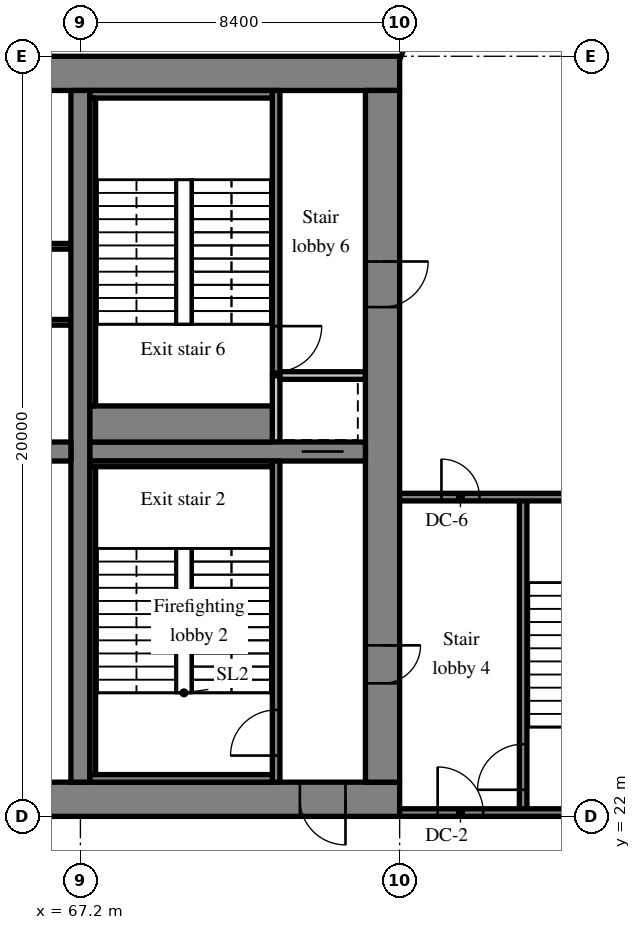
"""IFC4 building model, lengths in metres.
Left out: names, types, materials, properties, quantities, classifications, styles, units other than length and angle.
Written with IfcOpenShell. Run it as: python <this file> out.ifc"""

import sys

from ifc_helpers import new_model, si_unit, direction, frame, frame_2d, origin, place, context, subcontext, project, spatial, rectangle, extrude, source, transform, mapped, element, fill, save


model = new_model("IFC4")
c1 = context("Model", 3, precision=1e-05, world=origin(), true_north=direction((0.0, 1.0)))
c2 = subcontext(c1, "Body", "Model", "MODEL_VIEW")
j1 = project(units=[si_unit("LENGTHUNIT", "METRE"), si_unit("PLANEANGLEUNIT", "RADIAN")], contexts=[c1])
p1 = place(None, origin())
s1 = spatial("IfcSite", under=j1, at=p1, CompositionType="ELEMENT")
p2 = place(p1, origin())
s2 = spatial("IfcBuilding", under=s1, at=p2, CompositionType="ELEMENT")
p3 = place(p2, frame((0.0, 0.0, 121.8)))
s3 = spatial("IfcBuildingStorey", under=s2, at=p3, CompositionType="ELEMENT", Elevation=121.8)
m1 = source(origin(), c2, "Body", "SweptSolid", [
    extrude(rectangle(XDim=50.4, YDim=0.9, at=frame_2d((25.2, 0.0))), origin(), (0.0, 0.0, 1.0), 3.52),
])
p4 = place(p3, frame((25.2, 22.45, 0.0), z_axis=(0.0, 0.0, 1.0), x_axis=(1.0, 0.0, 0.0)))
e1 = element("IfcWall", 1, at=p4, inside=s3, PredefinedType="SHEAR", context=c2, shape_type="MappedRepresentation", body=[
    mapped(m1, transform((0.0, 0.0, 0.0), scale=1.0)),
])
m2 = source(origin(), c2, "Body", "SweptSolid", [
    extrude(rectangle(XDim=1.8, YDim=2.1, at=frame_2d((0.9, 1.05))), frame((0.0, 0.46, 0.0), z_axis=(0.0, -1.0, 0.0), x_axis=(1.0, 0.0, 0.0)), (0.0, 0.0, 1.0), 0.92),
])
p5 = place(p4, frame((15.9, 0.0, 0.0)))
e2 = element("IfcOpeningElement", 2, at=p5, cuts=e1, PredefinedType="OPENING", context=c2, shape_type="MappedRepresentation", body=[
    mapped(m2, transform((0.0, 0.0, 0.0), scale=1.0)),
])
m3 = source(origin(), c2, "Body", "SweptSolid", [
    extrude(rectangle(XDim=1.2, YDim=2.1, at=frame_2d((0.6, 1.05))), frame((0.0, 0.46, 0.0), z_axis=(0.0, -1.0, 0.0), x_axis=(1.0, 0.0, 0.0)), (0.0, 0.0, 1.0), 0.92),
])
p6 = place(p4, frame((26.975, 0.0, 0.0)))
e3 = element("IfcOpeningElement", 3, at=p6, cuts=e1, PredefinedType="OPENING", context=c2, shape_type="MappedRepresentation", body=[
    mapped(m3, transform((0.0, 0.0, 0.0), scale=1.0)),
])
m4 = source(origin(), c2, "Body", "SweptSolid", [
    extrude(rectangle(XDim=0.9, YDim=2.1, at=frame_2d((0.45, 1.05))), frame((0.0, 0.46, 0.0), z_axis=(0.0, -1.0, 0.0), x_axis=(1.0, 0.0, 0.0)), (0.0, 0.0, 1.0), 0.92),
])
p7 = place(p4, frame((33.75, 0.0, 0.0)))
e4 = element("IfcOpeningElement", 4, at=p7, cuts=e1, PredefinedType="OPENING", context=c2, shape_type="MappedRepresentation", body=[
    mapped(m4, transform((0.0, 0.0, 0.0), scale=1.0)),
])
p8 = place(p4, frame((30.75, 0.0, 0.0)))
e5 = element("IfcOpeningElement", 5, at=p8, cuts=e1, PredefinedType="OPENING", context=c2, shape_type="MappedRepresentation", body=[
    mapped(m4, transform((0.0, 0.0, 0.0), scale=1.0)),
])
p9 = place(p4, frame((38.275, 0.0, 0.0)))
e6 = element("IfcOpeningElement", 6, at=p9, cuts=e1, PredefinedType="OPENING", context=c2, shape_type="MappedRepresentation", body=[
    mapped(m4, transform((0.0, 0.0, 0.0), scale=1.0)),
])
p10 = place(p4, frame((6.45, 0.0, 0.0)))
e7 = element("IfcOpeningElement", 7, at=p10, cuts=e1, PredefinedType="OPENING", context=c2, shape_type="MappedRepresentation", body=[
    mapped(m3, transform((0.0, 0.0, 0.0), scale=1.0)),
])
p11 = place(p4, frame((47.775, 0.0, 0.0)))
e8 = element("IfcOpeningElement", 8, at=p11, cuts=e1, PredefinedType="OPENING", context=c2, shape_type="MappedRepresentation", body=[
    mapped(m3, transform((0.0, 0.0, 0.0), scale=1.0)),
])
p12 = place(p3, frame((25.2, 41.55, 0.0), z_axis=(0.0, 0.0, 1.0), x_axis=(1.0, 0.0, 0.0)))
e9 = element("IfcWall", 9, at=p12, inside=s3, PredefinedType="SHEAR", context=c2, shape_type="MappedRepresentation", body=[
    mapped(m1, transform((0.0, 0.0, 0.0), scale=1.0)),
])
m5 = source(origin(), c2, "Body", "SweptSolid", [
    extrude(rectangle(XDim=18.2, YDim=0.9, at=frame_2d((9.1, 0.0))), origin(), (0.0, 0.0, 1.0), 3.52),
])
p13 = place(p3, frame((75.15, 22.9, 0.0), z_axis=(0.0, 0.0, 1.0), x_axis=(0.0, 1.0, 0.0)))
e10 = element("IfcWall", 10, at=p13, inside=s3, PredefinedType="SHEAR", context=c2, shape_type="MappedRepresentation", body=[
    mapped(m5, transform((0.0, 0.0, 0.0), scale=1.0)),
])
m6 = source(origin(), c2, "Body", "SweptSolid", [
    extrude(rectangle(XDim=1.0, YDim=2.1, at=frame_2d((0.5, 1.05))), frame((0.0, 0.46, 0.0), z_axis=(0.0, -1.0, 0.0), x_axis=(1.0, 0.0, 0.0)), (0.0, 0.0, 1.0), 0.92),
])
p14 = place(p13, frame((2.6, 0.0, 0.0)))
e11 = element("IfcOpeningElement", 11, at=p14, cuts=e10, PredefinedType="OPENING", context=c2, shape_type="MappedRepresentation", body=[
    mapped(m6, transform((0.0, 0.0, 0.0), scale=1.0)),
])
p15 = place(p13, frame((12.5, 0.0, 0.0)))
e12 = element("IfcOpeningElement", 12, at=p15, cuts=e10, PredefinedType="OPENING", context=c2, shape_type="MappedRepresentation", body=[
    mapped(m3, transform((0.0, 0.0, 0.0), scale=1.0)),
])
m7 = source(origin(), c2, "Body", "SweptSolid", [
    extrude(rectangle(XDim=18.2, YDim=0.5, at=frame_2d((9.1, 0.0))), origin(), (0.0, 0.0, 1.0), 3.52),
])
p16 = place(p3, frame((67.2, 22.9, 0.0), z_axis=(0.0, 0.0, 1.0), x_axis=(0.0, 1.0, 0.0)))
e13 = element("IfcWall", 13, at=p16, inside=s3, PredefinedType="SHEAR", context=c2, shape_type="MappedRepresentation", body=[
    mapped(m7, transform((0.0, 0.0, 0.0), scale=1.0)),
])
m8 = source(origin(), c2, "Body", "SweptSolid", [
    extrude(rectangle(XDim=16.3, YDim=0.5, at=frame_2d((8.15, 0.0))), origin(), (0.0, 0.0, 1.0), 3.52),
])
p17 = place(p3, frame((50.65, 31.6, 0.0), z_axis=(0.0, 0.0, 1.0), x_axis=(1.0, 0.0, 0.0)))
e14 = element("IfcWall", 14, at=p17, inside=s3, PredefinedType="SHEAR", context=c2, shape_type="MappedRepresentation", body=[
    mapped(m8, transform((0.0, 0.0, 0.0), scale=1.0)),
])
m9 = source(origin(), c2, "Body", "SweptSolid", [
    extrude(rectangle(XDim=1.0, YDim=2.1, at=frame_2d((0.5, 1.05))), frame((0.0, 0.26, 0.0), z_axis=(0.0, -1.0, 0.0), x_axis=(1.0, 0.0, 0.0)), (0.0, 0.0, 1.0), 0.52),
])
p18 = place(p17, frame((0.575, 0.0, 0.0)))
e15 = element("IfcOpeningElement", 15, at=p18, cuts=e14, PredefinedType="OPENING", context=c2, shape_type="MappedRepresentation", body=[
    mapped(m9, transform((0.0, 0.0, 0.0), scale=1.0)),
])
m10 = source(origin(), c2, "Body", "SweptSolid", [
    extrude(rectangle(XDim=7.25, YDim=0.5, at=frame_2d((3.625, 0.0))), origin(), (0.0, 0.0, 1.0), 3.52),
])
p19 = place(p3, frame((67.45, 31.6, 0.0), z_axis=(0.0, 0.0, 1.0), x_axis=(1.0, 0.0, 0.0)))
e16 = element("IfcWall", 16, at=p19, inside=s3, PredefinedType="SHEAR", context=c2, shape_type="MappedRepresentation", body=[
    mapped(m10, transform((0.0, 0.0, 0.0), scale=1.0)),
])
m11 = source(origin(), c2, "Body", "SweptSolid", [
    extrude(rectangle(XDim=1.1, YDim=2.1, at=frame_2d((0.55, 1.05))), frame((0.0, 0.26, 0.0), z_axis=(0.0, -1.0, 0.0), x_axis=(1.0, 0.0, 0.0)), (0.0, 0.0, 1.0), 0.52),
])
p20 = place(p19, frame((5.575, 0.0, 0.0)))
e17 = element("IfcOpeningElement", 17, at=p20, cuts=e16, PredefinedType="OPENING", context=c2, shape_type="MappedRepresentation", body=[
    mapped(m11, transform((0.0, 0.0, 0.0), scale=1.0)),
])
m12 = source(origin(), c2, "Body", "SweptSolid", [
    extrude(rectangle(XDim=14.15, YDim=0.15, at=frame_2d((7.075, 0.0))), origin(), (0.0, 0.0, 1.0), 3.52),
])
p21 = place(p3, frame((66.95, 35.0, 0.0), z_axis=(0.0, 0.0, 1.0), x_axis=(-1.0, 0.0, 0.0)))
e18 = element("IfcWall", 18, at=p21, inside=s3, PredefinedType="PARTITIONING", context=c2, shape_type="MappedRepresentation", body=[
    mapped(m12, transform((0.0, 0.0, 0.0), scale=1.0)),
])
m13 = source(origin(), c2, "Body", "SweptSolid", [
    extrude(rectangle(XDim=0.9, YDim=2.1, at=frame_2d((0.45, 1.05))), frame((0.0, 0.085, 0.0), z_axis=(0.0, -1.0, 0.0), x_axis=(1.0, 0.0, 0.0)), (0.0, 0.0, 1.0), 0.17),
])
p22 = place(p21, frame((3.421, 0.0, 0.0)))
e19 = element("IfcOpeningElement", 19, at=p22, cuts=e18, PredefinedType="OPENING", context=c2, shape_type="MappedRepresentation", body=[
    mapped(m13, transform((0.0, 0.0, 0.0), scale=1.0)),
])
p23 = place(p21, frame((10.458, 0.0, 0.0)))
e20 = element("IfcOpeningElement", 20, at=p23, cuts=e18, PredefinedType="OPENING", context=c2, shape_type="MappedRepresentation", body=[
    mapped(m13, transform((0.0, 0.0, 0.0), scale=1.0)),
])
m14 = source(origin(), c2, "Body", "SweptSolid", [
    extrude(rectangle(XDim=16.3, YDim=0.15, at=frame_2d((8.15, 0.0))), origin(), (0.0, 0.0, 1.0), 3.52),
])
p24 = place(p3, frame((66.95, 37.0, 0.0), z_axis=(0.0, 0.0, 1.0), x_axis=(-1.0, 0.0, 0.0)))
e21 = element("IfcWall", 21, at=p24, inside=s3, PredefinedType="PARTITIONING", context=c2, shape_type="MappedRepresentation", body=[
    mapped(m14, transform((0.0, 0.0, 0.0), scale=1.0)),
])
p25 = place(p24, frame((6.478, 0.0, 0.0)))
e22 = element("IfcOpeningElement", 22, at=p25, cuts=e21, PredefinedType="OPENING", context=c2, shape_type="MappedRepresentation", body=[
    mapped(m13, transform((0.0, 0.0, 0.0), scale=1.0)),
])
p26 = place(p24, frame((14.627, 0.0, 0.0)))
e23 = element("IfcOpeningElement", 23, at=p26, cuts=e21, PredefinedType="OPENING", context=c2, shape_type="MappedRepresentation", body=[
    mapped(m13, transform((0.0, 0.0, 0.0), scale=1.0)),
])
m15 = source(origin(), c2, "Body", "SweptSolid", [
    extrude(rectangle(XDim=8.45, YDim=0.2, at=frame_2d((4.225, 0.0))), origin(), (0.0, 0.0, 1.0), 3.52),
])
p27 = place(p3, frame((72.35, 22.9, 0.0), z_axis=(0.0, 0.0, 1.0), x_axis=(0.0, 1.0, 0.0)))
e24 = element("IfcWall", 24, at=p27, inside=s3, PredefinedType="SOLIDWALL", context=c2, shape_type="MappedRepresentation", body=[
    mapped(m15, transform((0.0, 0.0, 0.0), scale=1.0)),
])
m16 = source(origin(), c2, "Body", "SweptSolid", [
    extrude(rectangle(XDim=1.2, YDim=2.1, at=frame_2d((0.6, 1.05))), frame((0.0, 0.11, 0.0), z_axis=(0.0, -1.0, 0.0), x_axis=(1.0, 0.0, 0.0)), (0.0, 0.0, 1.0), 0.22),
])
p28 = place(p27, frame((0.7, 0.0, 0.0)))
e25 = element("IfcOpeningElement", 25, at=p28, cuts=e24, PredefinedType="OPENING", context=c2, shape_type="MappedRepresentation", body=[
    mapped(m16, transform((0.0, 0.0, 0.0), scale=1.0)),
])
m17 = source(origin(), c2, "Body", "SweptSolid", [
    extrude(rectangle(XDim=1.75, YDim=0.2, at=frame_2d((0.875, 0.0))), origin(), (0.0, 0.0, 1.0), 3.52),
])
p29 = place(p3, frame((72.35, 31.85, 0.0), z_axis=(0.0, 0.0, 1.0), x_axis=(0.0, 1.0, 0.0)))
e26 = element("IfcWall", 26, at=p29, inside=s3, PredefinedType="SOLIDWALL", context=c2, shape_type="MappedRepresentation", body=[
    mapped(m17, transform((0.0, 0.0, 0.0), scale=1.0)),
])
m18 = source(origin(), c2, "Body", "SweptSolid", [
    extrude(rectangle(XDim=2.25, YDim=0.2, at=frame_2d((1.125, 0.0))), origin(), (0.0, 0.0, 1.0), 3.52),
])
p30 = place(p3, frame((72.45, 33.6, 0.0), z_axis=(0.0, 0.0, 1.0), x_axis=(1.0, 0.0, 0.0)))
e27 = element("IfcWall", 27, at=p30, inside=s3, PredefinedType="SOLIDWALL", context=c2, shape_type="MappedRepresentation", body=[
    mapped(m18, transform((0.0, 0.0, 0.0), scale=1.0)),
])
m19 = source(origin(), c2, "Body", "SweptSolid", [
    extrude(rectangle(XDim=7.5, YDim=0.2, at=frame_2d((3.75, 0.0))), origin(), (0.0, 0.0, 1.0), 3.52),
])
p31 = place(p3, frame((72.35, 33.6, 0.0), z_axis=(0.0, 0.0, 1.0), x_axis=(0.0, 1.0, 0.0)))
e28 = element("IfcWall", 28, at=p31, inside=s3, PredefinedType="SOLIDWALL", context=c2, shape_type="MappedRepresentation", body=[
    mapped(m19, transform((0.0, 0.0, 0.0), scale=1.0)),
])
p32 = place(p31, frame((0.1, 0.0, 0.0)))
e29 = element("IfcOpeningElement", 29, at=p32, cuts=e28, PredefinedType="OPENING", context=c2, shape_type="MappedRepresentation", body=[
    mapped(m16, transform((0.0, 0.0, 0.0), scale=1.0)),
])
m20 = source(origin(), c2, "Body", "SweptSolid", [
    extrude(rectangle(XDim=8.3, YDim=0.2, at=frame_2d((4.15, 0.0))), origin(), (0.0, 0.0, 1.0), 3.52),
])
p33 = place(p3, frame((78.85, 22.1, 0.0), z_axis=(0.0, 0.0, 1.0), x_axis=(0.0, 1.0, 0.0)))
e30 = element("IfcWall", 30, at=p33, inside=s3, PredefinedType="SOLIDWALL", context=c2, shape_type="MappedRepresentation", body=[
    mapped(m20, transform((0.0, 0.0, 0.0), scale=1.0)),
])
p34 = place(p33, frame((0.6, 0.0, 0.0)))
e31 = element("IfcOpeningElement", 31, at=p34, cuts=e30, PredefinedType="OPENING", context=c2, shape_type="MappedRepresentation", body=[
    mapped(m16, transform((0.0, 0.0, 0.0), scale=1.0)),
])
m21 = source(origin(), c2, "Body", "SweptSolid", [
    extrude(rectangle(XDim=8.225, YDim=0.2, at=frame_2d((4.112, 0.0))), origin(), (0.0, 0.0, 1.0), 3.52),
])
p35 = place(p3, frame((83.825, 22.1, 0.0), z_axis=(0.0, 0.0, 1.0), x_axis=(-1.0, 0.0, 0.0)))
e32 = element("IfcWall", 32, at=p35, inside=s3, PredefinedType="SOLIDWALL", context=c2, shape_type="MappedRepresentation", body=[
    mapped(m21, transform((0.0, 0.0, 0.0), scale=1.0)),
])
p36 = place(p35, frame((6.025, 0.0, 0.0)))
e33 = element("IfcOpeningElement", 33, at=p36, cuts=e32, PredefinedType="OPENING", context=c2, shape_type="MappedRepresentation", body=[
    mapped(m16, transform((0.0, 0.0, 0.0), scale=1.0)),
])
p37 = place(p3, frame((83.825, 30.4, 0.0), z_axis=(0.0, 0.0, 1.0), x_axis=(-1.0, 0.0, 0.0)))
e34 = element("IfcWall", 34, at=p37, inside=s3, PredefinedType="SOLIDWALL", context=c2, shape_type="MappedRepresentation", body=[
    mapped(m21, transform((0.0, 0.0, 0.0), scale=1.0)),
])
m22 = source(origin(), c2, "Body", "SweptSolid", [
    extrude(rectangle(XDim=1.0, YDim=2.1, at=frame_2d((0.5, 1.05))), frame((0.0, 0.11, 0.0), z_axis=(0.0, -1.0, 0.0), x_axis=(1.0, 0.0, 0.0)), (0.0, 0.0, 1.0), 0.22),
])
p38 = place(p37, frame((6.125, 0.0, 0.0)))
e35 = element("IfcOpeningElement", 35, at=p38, cuts=e34, PredefinedType="OPENING", context=c2, shape_type="MappedRepresentation", body=[
    mapped(m22, transform((0.0, 0.0, 0.0), scale=1.0)),
])
m23 = source(origin(), c2, "Body", "SweptSolid", [
    extrude(rectangle(XDim=4.8, YDim=0.2, at=frame_2d((2.4, 0.0))), origin(), (0.0, 0.0, 1.0), 3.52),
])
p39 = place(p3, frame((67.45, 23.0, 0.0), z_axis=(0.0, 0.0, 1.0), x_axis=(1.0, 0.0, 0.0)))
e36 = element("IfcWall", 36, at=p39, inside=s3, PredefinedType="SOLIDWALL", context=c2, shape_type="MappedRepresentation", body=[
    mapped(m23, transform((0.0, 0.0, 0.0), scale=1.0)),
])
m24 = source(origin(), c2, "Body", "SweptSolid", [
    extrude(rectangle(XDim=4.8, YDim=0.15, at=frame_2d((2.4, 0.0))), origin(), (0.0, 0.0, 1.0), 3.52),
])
p40 = place(p3, frame((67.45, 31.275, 0.0), z_axis=(0.0, 0.0, 1.0), x_axis=(1.0, 0.0, 0.0)))
e37 = element("IfcWall", 37, at=p40, inside=s3, PredefinedType="SOLIDWALL", context=c2, shape_type="MappedRepresentation", body=[
    mapped(m24, transform((0.0, 0.0, 0.0), scale=1.0)),
])
m25 = source(origin(), c2, "Body", "SweptSolid", [
    extrude(rectangle(XDim=8.1, YDim=0.15, at=frame_2d((4.05, 0.0))), origin(), (0.0, 0.0, 1.0), 3.52),
])
p41 = place(p3, frame((67.525, 23.1, 0.0), z_axis=(0.0, 0.0, 1.0), x_axis=(0.0, 1.0, 0.0)))
e38 = element("IfcWall", 38, at=p41, inside=s3, PredefinedType="SOLIDWALL", context=c2, shape_type="MappedRepresentation", body=[
    mapped(m25, transform((0.0, 0.0, 0.0), scale=1.0)),
])
p42 = place(p3, frame((67.45, 41.0, 0.0), z_axis=(0.0, 0.0, 1.0), x_axis=(1.0, 0.0, 0.0)))
e39 = element("IfcWall", 39, at=p42, inside=s3, PredefinedType="SOLIDWALL", context=c2, shape_type="MappedRepresentation", body=[
    mapped(m23, transform((0.0, 0.0, 0.0), scale=1.0)),
])
m26 = source(origin(), c2, "Body", "SweptSolid", [
    extrude(rectangle(XDim=4.8, YDim=0.95, at=frame_2d((2.4, 0.0))), origin(), (0.0, 0.0, 1.0), 3.52),
])
p43 = place(p3, frame((67.45, 32.325, 0.0), z_axis=(0.0, 0.0, 1.0), x_axis=(1.0, 0.0, 0.0)))
e40 = element("IfcWall", 40, at=p43, inside=s3, PredefinedType="SOLIDWALL", context=c2, shape_type="MappedRepresentation", body=[
    mapped(m26, transform((0.0, 0.0, 0.0), scale=1.0)),
])
p44 = place(p3, frame((67.525, 32.8, 0.0), z_axis=(0.0, 0.0, 1.0), x_axis=(0.0, 1.0, 0.0)))
e41 = element("IfcWall", 41, at=p44, inside=s3, PredefinedType="SOLIDWALL", context=c2, shape_type="MappedRepresentation", body=[
    mapped(m25, transform((0.0, 0.0, 0.0), scale=1.0)),
])
m27 = source(origin(), c2, "Body", "SweptSolid", [
    extrude(rectangle(XDim=1.2, YDim=2.1, at=frame_2d((0.6, 1.05))), frame((0.0, 0.025, 0.0), z_axis=(0.0, -1.0, 0.0), x_axis=(1.0, 0.0, 0.0)), (0.0, 0.0, 1.0), 0.05),
])
p45 = place(p28, origin())
e42 = element("IfcDoor", 42, at=p45, inside=s3, OperationType="SINGLE_SWING_LEFT", PredefinedType="DOOR", context=c2, shape_type="MappedRepresentation", body=[
    mapped(m27, transform((0.0, 0.0, 0.0), scale=1.0)),
])
fill(e25, e42)
m28 = source(origin(), c2, "Body", "SweptSolid", [
    extrude(rectangle(XDim=1.2, YDim=2.1, at=frame_2d((0.6, 1.05))), frame((0.0, 0.375, 0.0), z_axis=(0.0, -1.0, 0.0), x_axis=(1.0, 0.0, 0.0)), (0.0, 0.0, 1.0), 0.05),
])
p46 = place(p11, origin())
e43 = element("IfcDoor", 43, at=p46, inside=s3, OperationType="SINGLE_SWING_RIGHT", PredefinedType="DOOR", context=c2, shape_type="MappedRepresentation", body=[
    mapped(m28, transform((0.0, 0.0, 0.0), scale=1.0)),
])
fill(e8, e43)
m29 = source(origin(), c2, "Body", "SweptSolid", [
    extrude(rectangle(XDim=1.1, YDim=2.1, at=frame_2d((0.55, 1.05))), frame((0.0, 0.025, 0.0), z_axis=(0.0, -1.0, 0.0), x_axis=(1.0, 0.0, 0.0)), (0.0, 0.0, 1.0), 0.05),
])
p47 = place(p20, origin())
e44 = element("IfcDoor", 44, at=p47, inside=s3, OperationType="SLIDING_TO_LEFT", PredefinedType="DOOR", context=c2, shape_type="MappedRepresentation", body=[
    mapped(m29, transform((0.0, 0.0, 0.0), scale=1.0)),
])
fill(e17, e44)
m30 = source(origin(), c2, "Body", "SweptSolid", [
    extrude(rectangle(XDim=1.0, YDim=2.1, at=frame_2d((0.5, 1.05))), frame((0.0, 0.025, 0.0), z_axis=(0.0, -1.0, 0.0), x_axis=(1.0, 0.0, 0.0)), (0.0, 0.0, 1.0), 0.05),
])
p48 = place(p14, origin())
e45 = element("IfcDoor", 45, at=p48, inside=s3, OperationType="SINGLE_SWING_RIGHT", PredefinedType="DOOR", context=c2, shape_type="MappedRepresentation", body=[
    mapped(m30, transform((0.0, 0.0, 0.0), scale=1.0)),
])
fill(e11, e45)
p49 = place(p32, origin())
e46 = element("IfcDoor", 46, at=p49, inside=s3, OperationType="SINGLE_SWING_RIGHT", PredefinedType="DOOR", context=c2, shape_type="MappedRepresentation", body=[
    mapped(m27, transform((0.0, 0.0, 0.0), scale=1.0)),
])
fill(e29, e46)
p50 = place(p15, origin())
e47 = element("IfcDoor", 47, at=p50, inside=s3, OperationType="SINGLE_SWING_RIGHT", PredefinedType="DOOR", context=c2, shape_type="MappedRepresentation", body=[
    mapped(m27, transform((0.0, 0.0, 0.0), scale=1.0)),
])
fill(e12, e47)
p51 = place(p34, origin())
e48 = element("IfcDoor", 48, at=p51, inside=s3, OperationType="SINGLE_SWING_LEFT", PredefinedType="DOOR", context=c2, shape_type="MappedRepresentation", body=[
    mapped(m27, transform((0.0, 0.0, 0.0), scale=1.0)),
])
fill(e31, e48)
p52 = place(p36, origin())
e49 = element("IfcDoor", 49, at=p52, inside=s3, OperationType="SINGLE_SWING_RIGHT", PredefinedType="DOOR", context=c2, shape_type="MappedRepresentation", body=[
    mapped(m27, transform((0.0, 0.0, 0.0), scale=1.0)),
])
fill(e33, e49)
p53 = place(p38, origin())
e50 = element("IfcDoor", 50, at=p53, inside=s3, OperationType="SINGLE_SWING_RIGHT", PredefinedType="DOOR", context=c2, shape_type="MappedRepresentation", body=[
    mapped(m30, transform((0.0, 0.0, 0.0), scale=1.0)),
])
fill(e35, e50)
save(model, sys.argv[1])
